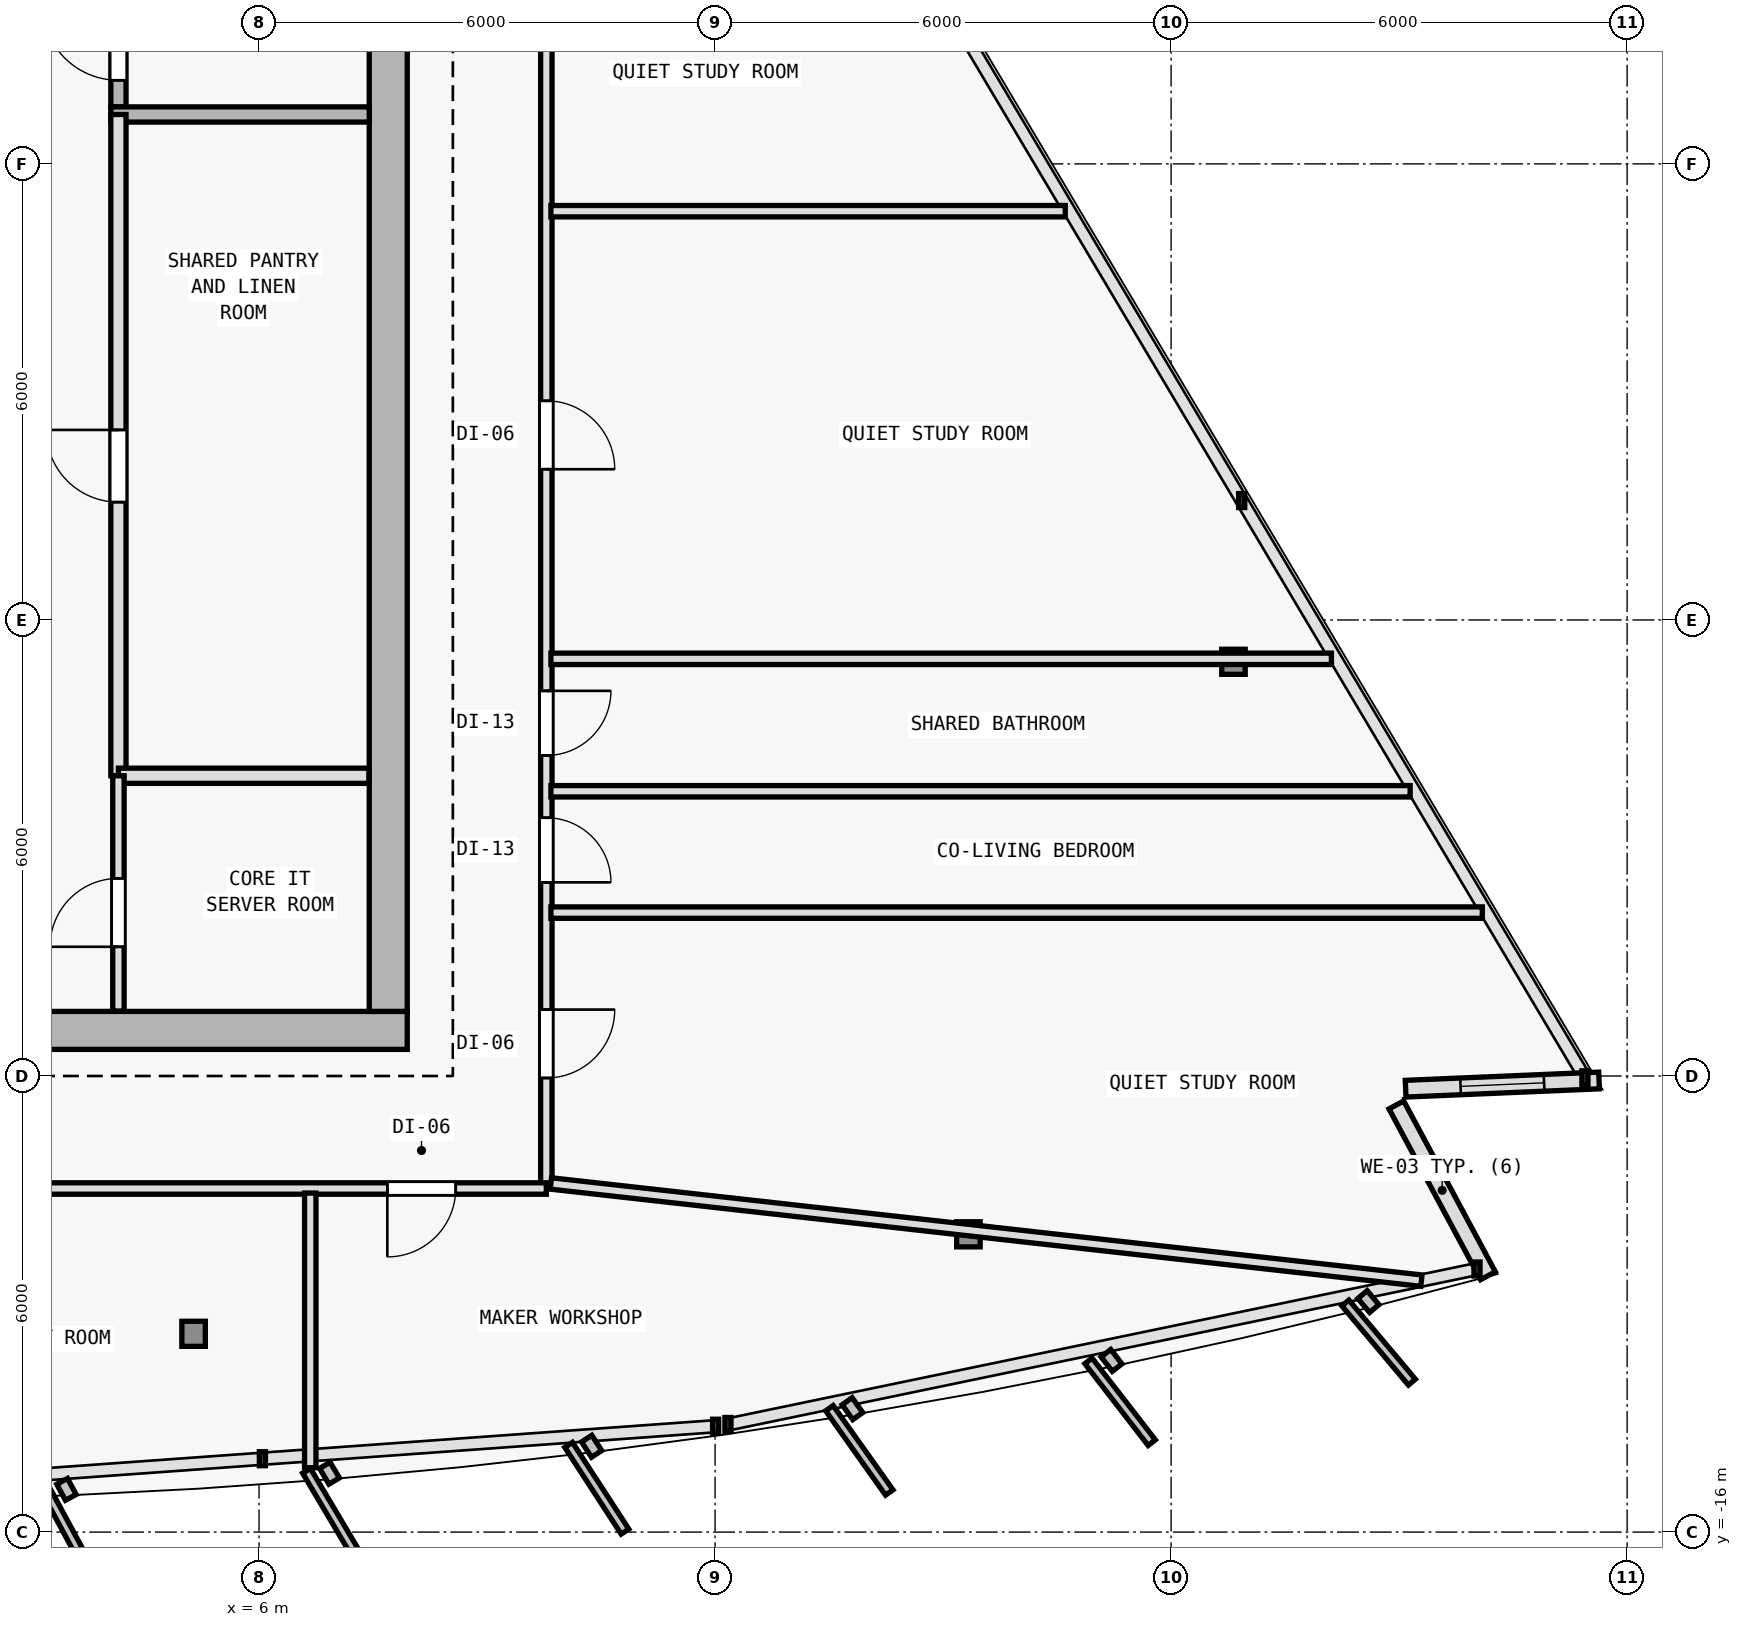
"""IFC4 building model, lengths in metres.
Left out: names, types, materials, properties, quantities, classifications, styles, units other than length and angle.
Written with IfcOpenShell. Run it as: python <this file> out.ifc"""

import sys

from ifc_helpers import new_model, si_unit, direction, frame, frame_2d, origin, origin_2d, place, context, subcontext, project, spatial, rectangle, i_section, extrude, element, fill, save


model = new_model("IFC4")
c1 = context("Model", 3, precision=1e-05, world=origin(), true_north=direction((0.0, 1.0)))
c2 = subcontext(c1, "Body", "Model", "MODEL_VIEW")
j1 = project(units=[si_unit("LENGTHUNIT", "METRE"), si_unit("PLANEANGLEUNIT", "RADIAN")], contexts=[c1])
p1 = place(None, origin())
s1 = spatial("IfcSite", under=j1, at=p1, CompositionType="ELEMENT")
p2 = place(p1, origin())
s2 = spatial("IfcBuilding", under=s1, at=p2, CompositionType="ELEMENT")
p3 = place(p2, frame((0.0, 0.0, 279.6)))
s3 = spatial("IfcBuildingStorey", under=s2, at=p3, CompositionType="ELEMENT", Elevation=279.6)
for number, where, z_axis, x_axis in (
    (1, (7.7, -9.4, 0.0), (0.0, 0.0, 1.0), (1.0, 0.0, 0.0)),
    (2, (7.7, 0.4, 0.0), (0.0, 0.0, 1.0), (1.0, 0.0, 0.0)),
):
    element("IfcColumn", number, at=place(p3, frame(where, z_axis=z_axis, x_axis=x_axis)), inside=s3, PredefinedType="COLUMN", context=c2, shape_type="SweptSolid", body=[
        extrude(i_section(OverallWidth=0.374, OverallDepth=0.372, WebThickness=0.012, FlangeThickness=0.02, FilletRadius=0.015, at=origin_2d()), origin(), (0.0, 0.0, 1.0), 3.6),
    ])
p4 = place(p3, frame((5.139, -13.392, 0.005), z_axis=(-0.006865841702, 0.035280909339, 0.999353850072), x_axis=(-0.981585848295, -0.191021523464, 0.0)))
e3 = element("IfcColumn", 3, at=p4, inside=s3, PredefinedType="COLUMN", context=c2, shape_type="SweptSolid", body=[
    extrude(i_section(OverallWidth=0.309, OverallDepth=0.33, WebThickness=0.011, FlangeThickness=0.019, FilletRadius=0.027, at=origin_2d()), origin(), (0.0, 0.0, 1.0), 3.592),
])
p5 = place(p3, frame((15.333, -12.083, 0.005), z_axis=(-0.020594893987, 0.033509183946, 0.999226193078), x_axis=(-0.851954850327, -0.523615252838, 0.0)))
e4 = element("IfcColumn", 4, at=p5, inside=s3, PredefinedType="COLUMN", context=c2, shape_type="SweptSolid", body=[
    extrude(i_section(OverallWidth=0.309, OverallDepth=0.33, WebThickness=0.011, FlangeThickness=0.019, FilletRadius=0.027, at=origin_2d()), origin(), (0.0, 0.0, 1.0), 3.592),
])
p6 = place(p3, frame((18.821, -4.55, 0.005), z_axis=(-0.026105701351, 0.021550800334, 0.999426863438), x_axis=(-0.636621915226, -0.771176073964, 0.0)))
e5 = element("IfcColumn", 5, at=p6, inside=s3, PredefinedType="COLUMN", context=c2, shape_type="SweptSolid", body=[
    extrude(i_section(OverallWidth=0.309, OverallDepth=0.33, WebThickness=0.011, FlangeThickness=0.019, FilletRadius=0.027, at=origin_2d()), origin(), (0.0, 0.0, 1.0), 3.591),
])
p7 = place(p3, frame((20.964, -10.381, 0.0), z_axis=(0.0, 0.0, 1.0), x_axis=(0.472728849632, -0.881207940685, 0.0)))
e6 = element("IfcWall", 6, at=p7, inside=s3, PredefinedType="SOLIDWALL", context=c2, shape_type="SweptSolid", body=[
    extrude(rectangle(XDim=2.55, YDim=0.22, at=frame_2d((1.275, 0.0))), origin(), (0.0, 0.0, 1.0), 3.35),
])
p8 = place(p3, frame((23.631, -10.059, 0.0), z_axis=(0.0, 0.0, 1.0), x_axis=(-0.999098350703, -0.042455690107, 0.0)))
e7 = element("IfcWall", 7, at=p8, inside=s3, PredefinedType="SOLIDWALL", context=c2, shape_type="SweptSolid", body=[
    extrude(rectangle(XDim=2.547, YDim=0.22, at=frame_2d((1.274, 0.0))), origin(), (0.0, 0.0, 1.0), 3.35),
])
p9 = place(p8, frame((0.724, 0.0, 0.62)))
e8 = element("IfcOpeningElement", 8, at=p9, cuts=e7, PredefinedType="OPENING", context=c2, shape_type="SweptSolid", body=[
    extrude(rectangle(XDim=1.1, YDim=1.8, at=frame_2d((0.55, 0.9))), frame((0.0, 0.12, 0.0), z_axis=(0.0, -1.0, 0.0), x_axis=(1.0, 0.0, 0.0)), (0.0, 0.0, 1.0), 0.24),
])
p10 = place(p3, frame((-7.95, -9.4, 0.0), z_axis=(0.0, 0.0, 1.0), x_axis=(1.0, 0.0, 0.0)))
e9 = element("IfcWall", 9, at=p10, inside=s3, PredefinedType="SHEAR", context=c2, shape_type="SweptSolid", body=[
    extrude(rectangle(XDim=15.9, YDim=0.5, at=frame_2d((7.95, 0.0))), origin(), (0.0, 0.0, 1.0), 3.35),
])
p11 = place(p10, frame((9.6, 0.0, 0.0)))
e10 = element("IfcOpeningElement", 10, at=p11, cuts=e9, PredefinedType="OPENING", context=c2, shape_type="SweptSolid", body=[
    extrude(rectangle(XDim=1.5, YDim=2.2, at=frame_2d((0.75, 1.1))), frame((0.0, 0.26, 0.0), z_axis=(0.0, -1.0, 0.0), x_axis=(1.0, 0.0, 0.0)), (0.0, 0.0, 1.0), 0.52),
])
p12 = place(p3, frame((7.7, 9.95, 0.0), z_axis=(0.0, 0.0, 1.0), x_axis=(0.0, -1.0, 0.0)))
e11 = element("IfcWall", 11, at=p12, inside=s3, PredefinedType="SHEAR", context=c2, shape_type="SweptSolid", body=[
    extrude(rectangle(XDim=19.1, YDim=0.5, at=frame_2d((9.55, 0.0))), origin(), (0.0, 0.0, 1.0), 3.35),
])
p13 = place(p3, frame((4.15, 2.75, 0.0), z_axis=(0.0, 0.0, 1.0), x_axis=(0.0, 1.0, 0.0)))
e12 = element("IfcWall", 12, at=p13, inside=s3, PredefinedType="SOLIDWALL", context=c2, shape_type="SweptSolid", body=[
    extrude(rectangle(XDim=7.2, YDim=0.2, at=frame_2d((3.6, 0.0))), origin(), (0.0, 0.0, 1.0), 3.35),
])
p14 = place(p13, frame((0.35, 0.0, 0.0)))
e13 = element("IfcOpeningElement", 13, at=p14, cuts=e12, PredefinedType="OPENING", context=c2, shape_type="SweptSolid", body=[
    extrude(rectangle(XDim=1.0, YDim=2.15, at=frame_2d((0.5, 1.075))), frame((0.0, 0.11, 0.0), z_axis=(0.0, -1.0, 0.0), x_axis=(1.0, 0.0, 0.0)), (0.0, 0.0, 1.0), 0.22),
])
p15 = place(p3, frame((4.05, 2.65, 0.0), z_axis=(0.0, 0.0, 1.0), x_axis=(1.0, 0.0, 0.0)))
e14 = element("IfcWall", 14, at=p15, inside=s3, PredefinedType="SOLIDWALL", context=c2, shape_type="SweptSolid", body=[
    extrude(rectangle(XDim=3.4, YDim=0.2, at=frame_2d((1.7, 0.0))), origin(), (0.0, 0.0, 1.0), 3.35),
])
p16 = place(p3, frame((4.15, -6.05, 0.0), z_axis=(0.0, 0.0, 1.0), x_axis=(0.0, 1.0, 0.0)))
e15 = element("IfcWall", 15, at=p16, inside=s3, PredefinedType="SOLIDWALL", context=c2, shape_type="SweptSolid", body=[
    extrude(rectangle(XDim=8.7, YDim=0.2, at=frame_2d((4.35, 0.0))), origin(), (0.0, 0.0, 1.0), 3.35),
])
p17 = place(p16, frame((3.6, 0.0, 0.0)))
e16 = element("IfcOpeningElement", 16, at=p17, cuts=e15, PredefinedType="OPENING", context=c2, shape_type="SweptSolid", body=[
    extrude(rectangle(XDim=0.95, YDim=2.1, at=frame_2d((0.475, 1.05))), frame((0.0, 0.11, 0.0), z_axis=(0.0, -1.0, 0.0), x_axis=(1.0, 0.0, 0.0)), (0.0, 0.0, 1.0), 0.22),
])
p18 = place(p3, frame((4.15, -6.05, 0.0), z_axis=(0.0, 0.0, 1.0), x_axis=(1.0, 0.0, 0.0)))
e17 = element("IfcWall", 17, at=p18, inside=s3, PredefinedType="SOLIDWALL", context=c2, shape_type="SweptSolid", body=[
    extrude(rectangle(XDim=3.295, YDim=0.2, at=frame_2d((1.647, 0.0))), origin(), (0.0, 0.0, 1.0), 3.35),
])
p19 = place(p3, frame((4.15, -9.145, 0.0), z_axis=(0.0, 0.0, 1.0), x_axis=(0.0, 1.0, 0.0)))
e18 = element("IfcWall", 18, at=p19, inside=s3, PredefinedType="PARTITIONING", context=c2, shape_type="SweptSolid", body=[
    extrude(rectangle(XDim=3.095, YDim=0.15, at=frame_2d((1.547, 0.0))), origin(), (0.0, 0.0, 1.0), 3.35),
])
p20 = place(p19, frame((0.845, 0.0, 0.0)))
e19 = element("IfcOpeningElement", 19, at=p20, cuts=e18, PredefinedType="OPENING", context=c2, shape_type="SweptSolid", body=[
    extrude(rectangle(XDim=0.9, YDim=2.1, at=frame_2d((0.45, 1.05))), frame((0.0, 0.085, 0.0), z_axis=(0.0, -1.0, 0.0), x_axis=(1.0, 0.0, 0.0)), (0.0, 0.0, 1.0), 0.17),
])
p21 = place(p3, frame((9.78, 8.226, 0.0), z_axis=(0.0, 0.0, 1.0), x_axis=(0.0, -1.0, 0.0)))
e20 = element("IfcWall", 20, at=p21, inside=s3, PredefinedType="PARTITIONING", context=c2, shape_type="SweptSolid", body=[
    extrude(rectangle(XDim=19.706, YDim=0.15, at=frame_2d((9.853, 0.0))), origin(), (0.0, 0.0, 1.0), 2.725),
])
p22 = place(p21, frame((17.352, 0.0, 0.0)))
e21 = element("IfcOpeningElement", 21, at=p22, cuts=e20, PredefinedType="OPENING", context=c2, shape_type="SweptSolid", body=[
    extrude(rectangle(XDim=0.9, YDim=2.1, at=frame_2d((0.45, 1.05))), frame((0.0, 0.085, 0.0), z_axis=(0.0, -1.0, 0.0), x_axis=(1.0, 0.0, 0.0)), (0.0, 0.0, 1.0), 0.17),
])
p23 = place(p21, frame((14.828, 0.0, 0.0)))
e22 = element("IfcOpeningElement", 22, at=p23, cuts=e20, PredefinedType="OPENING", context=c2, shape_type="SweptSolid", body=[
    extrude(rectangle(XDim=0.85, YDim=2.1, at=frame_2d((0.425, 1.05))), frame((0.0, 0.085, 0.0), z_axis=(0.0, -1.0, 0.0), x_axis=(1.0, 0.0, 0.0)), (0.0, 0.0, 1.0), 0.17),
])
p24 = place(p21, frame((13.159, 0.0, 0.0)))
e23 = element("IfcOpeningElement", 23, at=p24, cuts=e20, PredefinedType="OPENING", context=c2, shape_type="SweptSolid", body=[
    extrude(rectangle(XDim=0.85, YDim=2.1, at=frame_2d((0.425, 1.05))), frame((0.0, 0.085, 0.0), z_axis=(0.0, -1.0, 0.0), x_axis=(1.0, 0.0, 0.0)), (0.0, 0.0, 1.0), 0.17),
])
p25 = place(p21, frame((9.343, 0.0, 0.0)))
e24 = element("IfcOpeningElement", 24, at=p25, cuts=e20, PredefinedType="OPENING", context=c2, shape_type="SweptSolid", body=[
    extrude(rectangle(XDim=0.9, YDim=2.1, at=frame_2d((0.45, 1.05))), frame((0.0, 0.085, 0.0), z_axis=(0.0, -1.0, 0.0), x_axis=(1.0, 0.0, 0.0)), (0.0, 0.0, 1.0), 0.17),
])
p26 = place(p21, frame((3.063, 0.0, 0.0)))
e25 = element("IfcOpeningElement", 25, at=p26, cuts=e20, PredefinedType="OPENING", context=c2, shape_type="SweptSolid", body=[
    extrude(rectangle(XDim=0.9, YDim=2.1, at=frame_2d((0.45, 1.05))), frame((0.0, 0.085, 0.0), z_axis=(0.0, -1.0, 0.0), x_axis=(1.0, 0.0, 0.0)), (0.0, 0.0, 1.0), 0.17),
])
p27 = place(p3, frame((9.78, -11.48, 0.0), z_axis=(0.0, 0.0, 1.0), x_axis=(-1.0, 0.0, 0.0)))
e26 = element("IfcWall", 26, at=p27, inside=s3, PredefinedType="PARTITIONING", context=c2, shape_type="SweptSolid", body=[
    extrude(rectangle(XDim=19.56, YDim=0.15, at=frame_2d((9.78, 0.0))), origin(), (0.0, 0.0, 1.0), 2.875),
])
p28 = place(p27, frame((16.694, 0.0, 0.0)))
e27 = element("IfcOpeningElement", 27, at=p28, cuts=e26, PredefinedType="OPENING", context=c2, shape_type="SweptSolid", body=[
    extrude(rectangle(XDim=0.9, YDim=2.1, at=frame_2d((0.45, 1.05))), frame((0.0, 0.085, 0.0), z_axis=(0.0, -1.0, 0.0), x_axis=(1.0, 0.0, 0.0)), (0.0, 0.0, 1.0), 0.17),
])
p29 = place(p27, frame((8.556, 0.0, 0.0)))
e28 = element("IfcOpeningElement", 28, at=p29, cuts=e26, PredefinedType="OPENING", context=c2, shape_type="SweptSolid", body=[
    extrude(rectangle(XDim=0.9, YDim=2.1, at=frame_2d((0.45, 1.05))), frame((0.0, 0.085, 0.0), z_axis=(0.0, -1.0, 0.0), x_axis=(1.0, 0.0, 0.0)), (0.0, 0.0, 1.0), 0.17),
])
p30 = place(p27, frame((1.192, 0.0, 0.0)))
e29 = element("IfcOpeningElement", 29, at=p30, cuts=e26, PredefinedType="OPENING", context=c2, shape_type="SweptSolid", body=[
    extrude(rectangle(XDim=0.9, YDim=2.1, at=frame_2d((0.45, 1.05))), frame((0.0, 0.085, 0.0), z_axis=(0.0, -1.0, 0.0), x_axis=(1.0, 0.0, 0.0)), (0.0, 0.0, 1.0), 0.17),
])
p31 = place(p3, frame((9.839, -11.414, 0.0), z_axis=(0.0, 0.0, 1.0), x_axis=(0.993832479403, -0.1108918522, 0.0)))
e30 = element("IfcWall", 30, at=p31, inside=s3, PredefinedType="PARTITIONING", context=c2, shape_type="SweptSolid", body=[
    extrude(rectangle(XDim=11.525, YDim=0.15, at=frame_2d((5.763, 0.0))), origin(), (0.0, 0.0, 1.0), 2.995),
])
p32 = place(p3, frame((9.84, -4.512, 0.0), z_axis=(0.0, 0.0, 1.0), x_axis=(1.0, 0.0, 0.0)))
e31 = element("IfcWall", 31, at=p32, inside=s3, PredefinedType="PARTITIONING", context=c2, shape_type="SweptSolid", body=[
    extrude(rectangle(XDim=10.269, YDim=0.15, at=frame_2d((5.135, 0.0))), origin(), (0.0, 0.0, 1.0), 2.775),
])
p33 = place(p3, frame((9.84, -7.85, 0.0), z_axis=(0.0, 0.0, 1.0), x_axis=(1.0, 0.0, 0.0)))
e32 = element("IfcWall", 32, at=p33, inside=s3, PredefinedType="PARTITIONING", context=c2, shape_type="SweptSolid", body=[
    extrude(rectangle(XDim=12.254, YDim=0.15, at=frame_2d((6.127, 0.0))), origin(), (0.0, 0.0, 1.0), 2.775),
])
p34 = place(p3, frame((6.674, -11.54, 0.0), z_axis=(0.0, 0.0, 1.0), x_axis=(0.0, -1.0, 0.0)))
e33 = element("IfcWall", 33, at=p34, inside=s3, PredefinedType="PARTITIONING", context=c2, shape_type="SweptSolid", body=[
    extrude(rectangle(XDim=3.613, YDim=0.15, at=frame_2d((1.807, 0.0))), origin(), (0.0, 0.0, 1.0), 2.775),
])
p35 = place(p3, frame((9.84, -6.254, 0.0), z_axis=(0.0, 0.0, 1.0), x_axis=(1.0, 0.0, 0.0)))
e34 = element("IfcWall", 34, at=p35, inside=s3, PredefinedType="PARTITIONING", context=c2, shape_type="SweptSolid", body=[
    extrude(rectangle(XDim=11.305, YDim=0.15, at=frame_2d((5.653, 0.0))), origin(), (0.0, 0.0, 1.0), 2.775),
])
p36 = place(p3, frame((9.84, 1.378, 0.0), z_axis=(0.0, 0.0, 1.0), x_axis=(1.0, 0.0, 0.0)))
e35 = element("IfcWall", 35, at=p36, inside=s3, PredefinedType="PARTITIONING", context=c2, shape_type="SweptSolid", body=[
    extrude(rectangle(XDim=6.767, YDim=0.15, at=frame_2d((3.384, 0.0))), origin(), (0.0, 0.0, 1.0), 3.015),
])
p37 = place(p9, origin())
e36 = element("IfcWindow", 36, at=p37, inside=s3, PartitioningType="SINGLE_PANEL", PredefinedType="WINDOW", context=c2, shape_type="SweptSolid", body=[
    extrude(rectangle(XDim=1.1, YDim=1.8, at=frame_2d((0.55, 0.9))), frame((0.0, 0.03, 0.0), z_axis=(0.0, -1.0, 0.0), x_axis=(1.0, 0.0, 0.0)), (0.0, 0.0, 1.0), 0.06),
])
fill(e8, e36)
p38 = place(p14, origin())
e37 = element("IfcDoor", 37, at=p38, inside=s3, OperationType="SINGLE_SWING_RIGHT", PredefinedType="DOOR", context=c2, shape_type="SweptSolid", body=[
    extrude(rectangle(XDim=1.0, YDim=2.15, at=frame_2d((0.5, 1.075))), frame((0.0, 0.025, 0.0), z_axis=(0.0, -1.0, 0.0), x_axis=(1.0, 0.0, 0.0)), (0.0, 0.0, 1.0), 0.05),
])
fill(e13, e37)
p39 = place(p17, origin())
e38 = element("IfcDoor", 38, at=p39, inside=s3, OperationType="SINGLE_SWING_RIGHT", PredefinedType="DOOR", context=c2, shape_type="SweptSolid", body=[
    extrude(rectangle(XDim=0.95, YDim=2.1, at=frame_2d((0.475, 1.05))), frame((0.0, 0.025, 0.0), z_axis=(0.0, -1.0, 0.0), x_axis=(1.0, 0.0, 0.0)), (0.0, 0.0, 1.0), 0.05),
])
fill(e16, e38)
p40 = place(p20, origin())
e39 = element("IfcDoor", 39, at=p40, inside=s3, OperationType="SINGLE_SWING_LEFT", PredefinedType="DOOR", context=c2, shape_type="SweptSolid", body=[
    extrude(rectangle(XDim=0.9, YDim=2.1, at=frame_2d((0.45, 1.05))), frame((0.0, 0.025, 0.0), z_axis=(0.0, -1.0, 0.0), x_axis=(1.0, 0.0, 0.0)), (0.0, 0.0, 1.0), 0.05),
])
fill(e19, e39)
p41 = place(p30, origin())
e40 = element("IfcDoor", 40, at=p41, inside=s3, OperationType="SINGLE_SWING_RIGHT", PredefinedType="DOOR", context=c2, shape_type="SweptSolid", body=[
    extrude(rectangle(XDim=0.9, YDim=2.1, at=frame_2d((0.45, 1.05))), frame((0.0, 0.025, 0.0), z_axis=(0.0, -1.0, 0.0), x_axis=(1.0, 0.0, 0.0)), (0.0, 0.0, 1.0), 0.05),
])
fill(e29, e40)
p42 = place(p22, origin())
e41 = element("IfcDoor", 41, at=p42, inside=s3, OperationType="SINGLE_SWING_LEFT", PredefinedType="DOOR", context=c2, shape_type="SweptSolid", body=[
    extrude(rectangle(XDim=0.9, YDim=2.1, at=frame_2d((0.45, 1.05))), frame((0.0, 0.025, 0.0), z_axis=(0.0, -1.0, 0.0), x_axis=(1.0, 0.0, 0.0)), (0.0, 0.0, 1.0), 0.05),
])
fill(e21, e41)
p43 = place(p23, origin())
e42 = element("IfcDoor", 42, at=p43, inside=s3, OperationType="SINGLE_SWING_RIGHT", PredefinedType="DOOR", context=c2, shape_type="SweptSolid", body=[
    extrude(rectangle(XDim=0.85, YDim=2.1, at=frame_2d((0.425, 1.05))), frame((0.0, 0.025, 0.0), z_axis=(0.0, -1.0, 0.0), x_axis=(1.0, 0.0, 0.0)), (0.0, 0.0, 1.0), 0.05),
])
fill(e22, e42)
p44 = place(p24, origin())
e43 = element("IfcDoor", 43, at=p44, inside=s3, OperationType="SINGLE_SWING_LEFT", PredefinedType="DOOR", context=c2, shape_type="SweptSolid", body=[
    extrude(rectangle(XDim=0.85, YDim=2.1, at=frame_2d((0.425, 1.05))), frame((0.0, 0.025, 0.0), z_axis=(0.0, -1.0, 0.0), x_axis=(1.0, 0.0, 0.0)), (0.0, 0.0, 1.0), 0.05),
])
fill(e23, e43)
p45 = place(p25, origin())
e44 = element("IfcDoor", 44, at=p45, inside=s3, OperationType="SINGLE_SWING_RIGHT", PredefinedType="DOOR", context=c2, shape_type="SweptSolid", body=[
    extrude(rectangle(XDim=0.9, YDim=2.1, at=frame_2d((0.45, 1.05))), frame((0.0, 0.025, 0.0), z_axis=(0.0, -1.0, 0.0), x_axis=(1.0, 0.0, 0.0)), (0.0, 0.0, 1.0), 0.05),
])
fill(e24, e44)
save(model, sys.argv[1])
